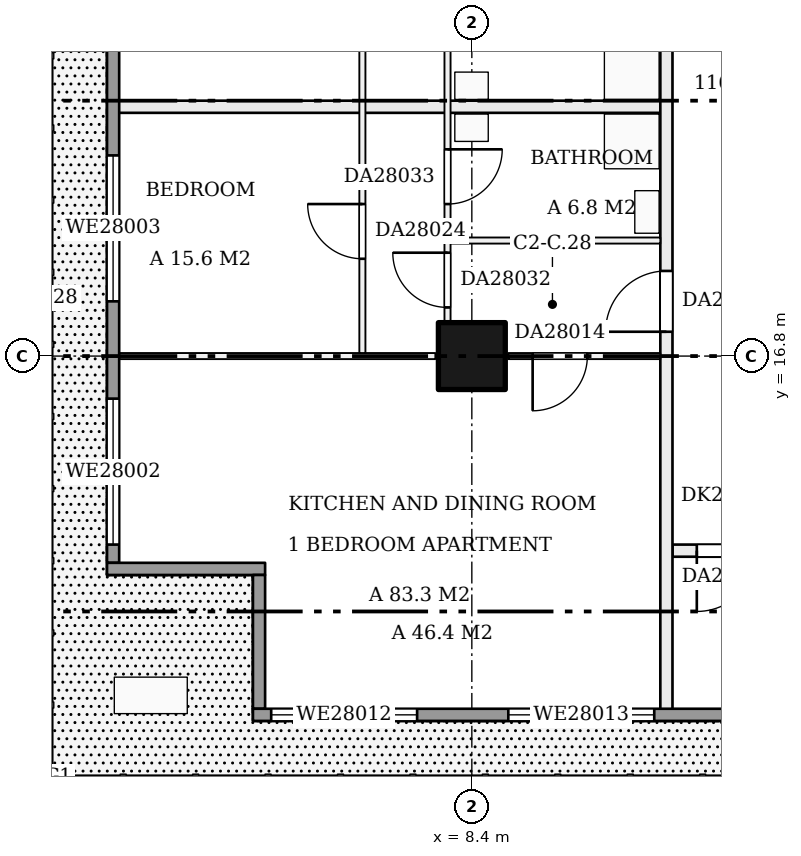
"""IFC4 building model, lengths in metres.
Left out: names, types, materials, properties, quantities, classifications, styles, units other than length and angle.
Written with IfcOpenShell. Run it as: python <this file> out.ifc"""

import sys

from ifc_helpers import new_model, si_unit, direction, frame, frame_2d, origin, origin_2d, place, context, subcontext, project, spatial, rectangle, extrude, element, fill, save


model = new_model("IFC4")
c1 = context("Model", 3, precision=1e-05, world=origin(), true_north=direction((0.0, 1.0)))
c2 = subcontext(c1, "Body", "Model", "MODEL_VIEW")
j1 = project(units=[si_unit("LENGTHUNIT", "METRE"), si_unit("PLANEANGLEUNIT", "RADIAN")], contexts=[c1])
p1 = place(None, origin())
s1 = spatial("IfcSite", under=j1, at=p1, CompositionType="ELEMENT")
p2 = place(p1, origin())
s2 = spatial("IfcBuilding", under=s1, at=p2, CompositionType="ELEMENT")
p3 = place(p2, frame((0.0, 0.0, 112.7)))
s3 = spatial("IfcBuildingStorey", under=s2, at=p3, CompositionType="ELEMENT", Elevation=112.7)
p4 = place(p3, frame((8.4, 16.8, 0.0), z_axis=(0.0, 0.0, 1.0), x_axis=(1.0, 0.0, 0.0)))
e1 = element("IfcColumn", 1, at=p4, inside=s3, PredefinedType="COLUMN", context=c2, shape_type="SweptSolid", body=[
    extrude(rectangle(XDim=1.1, YDim=1.1, at=origin_2d()), origin(), (0.0, 0.0, 1.0), 3.22),
])
p5 = place(p3, frame((11.7, 13.6, 0.0), z_axis=(0.0, 0.0, 1.0), x_axis=(1.0, 0.0, 0.0)))
e2 = element("IfcWall", 2, at=p5, inside=s3, PredefinedType="PARTITIONING", context=c2, shape_type="SweptSolid", body=[
    extrude(rectangle(XDim=1.8, YDim=0.2, at=frame_2d((0.9, 0.0))), origin(), (0.0, 0.0, 1.0), 3.22),
])
p6 = place(p5, frame((0.4, 0.0, 0.0)))
e3 = element("IfcOpeningElement", 3, at=p6, cuts=e2, PredefinedType="OPENING", context=c2, shape_type="SweptSolid", body=[
    extrude(rectangle(XDim=1.0, YDim=2.1, at=frame_2d((0.5, 1.05))), frame((0.0, 0.11, 0.0), z_axis=(0.0, -1.0, 0.0), x_axis=(1.0, 0.0, 0.0)), (0.0, 0.0, 1.0), 0.22),
])
p7 = place(p3, frame((2.5, 16.8, 0.0), z_axis=(0.0, 0.0, 1.0), x_axis=(1.0, 0.0, 0.0)))
e4 = element("IfcWall", 4, at=p7, inside=s3, PredefinedType="PARTITIONING", context=c2, shape_type="SweptSolid", body=[
    extrude(rectangle(XDim=5.3, YDim=0.1, at=frame_2d((2.65, 0.0))), origin(), (0.0, 0.0, 1.0), 3.22),
])
p8 = place(p3, frame((9.0, 16.8, 0.0), z_axis=(0.0, 0.0, 1.0), x_axis=(1.0, 0.0, 0.0)))
e5 = element("IfcWall", 5, at=p8, inside=s3, PredefinedType="PARTITIONING", context=c2, shape_type="SweptSolid", body=[
    extrude(rectangle(XDim=2.5, YDim=0.1, at=frame_2d((1.25, 0.0))), origin(), (0.0, 0.0, 1.0), 3.22),
])
p9 = place(p8, frame((0.4, 0.0, 0.0)))
e6 = element("IfcOpeningElement", 6, at=p9, cuts=e5, PredefinedType="OPENING", context=c2, shape_type="SweptSolid", body=[
    extrude(rectangle(XDim=0.9, YDim=2.1, at=frame_2d((0.45, 1.05))), frame((0.0, 0.06, 0.0), z_axis=(0.0, -1.0, 0.0), x_axis=(1.0, 0.0, 0.0)), (0.0, 0.0, 1.0), 0.12),
])
p10 = place(p3, frame((8.05, 18.7, 0.0), z_axis=(0.0, 0.0, 1.0), x_axis=(1.0, 0.0, 0.0)))
e7 = element("IfcWall", 7, at=p10, inside=s3, PredefinedType="PARTITIONING", context=c2, shape_type="SweptSolid", body=[
    extrude(rectangle(XDim=3.45, YDim=0.1, at=frame_2d((1.725, 0.0))), origin(), (0.0, 0.0, 1.0), 3.22),
])
p11 = place(p3, frame((2.5, 20.9, 0.0), z_axis=(0.0, 0.0, 1.0), x_axis=(1.0, 0.0, 0.0)))
e8 = element("IfcWall", 8, at=p11, inside=s3, PredefinedType="PARTITIONING", context=c2, shape_type="SweptSolid", body=[
    extrude(rectangle(XDim=9.0, YDim=0.2, at=frame_2d((4.5, 0.0))), origin(), (0.0, 0.0, 1.0), 3.22),
])
p12 = place(p3, frame((6.6, 16.85, 0.0), z_axis=(0.0, 0.0, 1.0), x_axis=(0.0, 1.0, 0.0)))
e9 = element("IfcWall", 9, at=p12, inside=s3, PredefinedType="PARTITIONING", context=c2, shape_type="SweptSolid", body=[
    extrude(rectangle(XDim=25.05, YDim=0.1, at=frame_2d((12.525, 0.0))), origin(), (0.0, 0.0, 1.0), 3.22),
])
p13 = place(p12, frame((1.55, 0.0, 0.0)))
e10 = element("IfcOpeningElement", 10, at=p13, cuts=e9, PredefinedType="OPENING", context=c2, shape_type="SweptSolid", body=[
    extrude(rectangle(XDim=0.9, YDim=2.1, at=frame_2d((0.45, 1.05))), frame((0.0, 0.06, 0.0), z_axis=(0.0, -1.0, 0.0), x_axis=(1.0, 0.0, 0.0)), (0.0, 0.0, 1.0), 0.12),
])
p14 = place(p12, frame((7.15, 0.0, 0.0)))
e11 = element("IfcOpeningElement", 11, at=p14, cuts=e9, PredefinedType="OPENING", context=c2, shape_type="SweptSolid", body=[
    extrude(rectangle(XDim=0.9, YDim=2.1, at=frame_2d((0.45, 1.05))), frame((0.0, 0.06, 0.0), z_axis=(0.0, -1.0, 0.0), x_axis=(1.0, 0.0, 0.0)), (0.0, 0.0, 1.0), 0.12),
])
p15 = place(p12, frame((14.15, 0.0, 0.0)))
e12 = element("IfcOpeningElement", 12, at=p15, cuts=e9, PredefinedType="OPENING", context=c2, shape_type="SweptSolid", body=[
    extrude(rectangle(XDim=0.9, YDim=2.1, at=frame_2d((0.45, 1.05))), frame((0.0, 0.06, 0.0), z_axis=(0.0, -1.0, 0.0), x_axis=(1.0, 0.0, 0.0)), (0.0, 0.0, 1.0), 0.12),
])
p16 = place(p12, frame((18.35, 0.0, 0.0)))
e13 = element("IfcOpeningElement", 13, at=p16, cuts=e9, PredefinedType="OPENING", context=c2, shape_type="SweptSolid", body=[
    extrude(rectangle(XDim=0.9, YDim=2.1, at=frame_2d((0.45, 1.05))), frame((0.0, 0.06, 0.0), z_axis=(0.0, -1.0, 0.0), x_axis=(1.0, 0.0, 0.0)), (0.0, 0.0, 1.0), 0.12),
])
p17 = place(p12, frame((22.55, 0.0, 0.0)))
e14 = element("IfcOpeningElement", 14, at=p17, cuts=e9, PredefinedType="OPENING", context=c2, shape_type="SweptSolid", body=[
    extrude(rectangle(XDim=0.9, YDim=2.1, at=frame_2d((0.45, 1.05))), frame((0.0, 0.06, 0.0), z_axis=(0.0, -1.0, 0.0), x_axis=(1.0, 0.0, 0.0)), (0.0, 0.0, 1.0), 0.12),
])
p18 = place(p3, frame((8.0, 16.85, 0.0), z_axis=(0.0, 0.0, 1.0), x_axis=(0.0, 1.0, 0.0)))
e15 = element("IfcWall", 15, at=p18, inside=s3, PredefinedType="PARTITIONING", context=c2, shape_type="SweptSolid", body=[
    extrude(rectangle(XDim=16.65, YDim=0.1, at=frame_2d((8.325, 0.0))), origin(), (0.0, 0.0, 1.0), 3.22),
])
p19 = place(p18, frame((0.75, 0.0, 0.0)))
e16 = element("IfcOpeningElement", 16, at=p19, cuts=e15, PredefinedType="OPENING", context=c2, shape_type="SweptSolid", body=[
    extrude(rectangle(XDim=0.9, YDim=2.1, at=frame_2d((0.45, 1.05))), frame((0.0, 0.06, 0.0), z_axis=(0.0, -1.0, 0.0), x_axis=(1.0, 0.0, 0.0)), (0.0, 0.0, 1.0), 0.12),
])
p20 = place(p18, frame((2.45, 0.0, 0.0)))
e17 = element("IfcOpeningElement", 17, at=p20, cuts=e15, PredefinedType="OPENING", context=c2, shape_type="SweptSolid", body=[
    extrude(rectangle(XDim=0.9, YDim=2.1, at=frame_2d((0.45, 1.05))), frame((0.0, 0.06, 0.0), z_axis=(0.0, -1.0, 0.0), x_axis=(1.0, 0.0, 0.0)), (0.0, 0.0, 1.0), 0.12),
])
p21 = place(p18, frame((9.075, 0.0, 0.0)))
e18 = element("IfcOpeningElement", 18, at=p21, cuts=e15, PredefinedType="OPENING", context=c2, shape_type="SweptSolid", body=[
    extrude(rectangle(XDim=0.9, YDim=2.1, at=frame_2d((0.45, 1.05))), frame((0.0, 0.06, 0.0), z_axis=(0.0, -1.0, 0.0), x_axis=(1.0, 0.0, 0.0)), (0.0, 0.0, 1.0), 0.12),
])
p22 = place(p18, frame((5.25, 0.0, 0.0)))
e19 = element("IfcOpeningElement", 19, at=p22, cuts=e15, PredefinedType="OPENING", context=c2, shape_type="SweptSolid", body=[
    extrude(rectangle(XDim=0.9, YDim=2.1, at=frame_2d((0.45, 1.05))), frame((0.0, 0.06, 0.0), z_axis=(0.0, -1.0, 0.0), x_axis=(1.0, 0.0, 0.0)), (0.0, 0.0, 1.0), 0.12),
])
p23 = place(p18, frame((11.2, 0.0, 0.0)))
e20 = element("IfcOpeningElement", 20, at=p23, cuts=e15, PredefinedType="OPENING", context=c2, shape_type="SweptSolid", body=[
    extrude(rectangle(XDim=0.9, YDim=2.1, at=frame_2d((0.45, 1.05))), frame((0.0, 0.06, 0.0), z_axis=(0.0, -1.0, 0.0), x_axis=(1.0, 0.0, 0.0)), (0.0, 0.0, 1.0), 0.12),
])
p24 = place(p18, frame((14.425, 0.0, 0.0)))
e21 = element("IfcOpeningElement", 21, at=p24, cuts=e15, PredefinedType="OPENING", context=c2, shape_type="SweptSolid", body=[
    extrude(rectangle(XDim=0.9, YDim=2.1, at=frame_2d((0.45, 1.05))), frame((0.0, 0.06, 0.0), z_axis=(0.0, -1.0, 0.0), x_axis=(1.0, 0.0, 0.0)), (0.0, 0.0, 1.0), 0.12),
])
p25 = place(p3, frame((11.6, 10.9, 0.0), z_axis=(0.0, 0.0, 1.0), x_axis=(0.0, 1.0, 0.0)))
e22 = element("IfcWall", 22, at=p25, inside=s3, PredefinedType="PARTITIONING", context=c2, shape_type="SweptSolid", body=[
    extrude(rectangle(XDim=31.1, YDim=0.2, at=frame_2d((15.55, 0.0))), origin(), (0.0, 0.0, 1.0), 3.22),
])
p26 = place(p25, frame((6.3, 0.0, 0.0)))
e23 = element("IfcOpeningElement", 23, at=p26, cuts=e22, PredefinedType="OPENING", context=c2, shape_type="SweptSolid", body=[
    extrude(rectangle(XDim=1.0, YDim=2.1, at=frame_2d((0.5, 1.05))), frame((0.0, 0.11, 0.0), z_axis=(0.0, -1.0, 0.0), x_axis=(1.0, 0.0, 0.0)), (0.0, 0.0, 1.0), 0.22),
])
p27 = place(p25, frame((14.225, 0.0, 0.0)))
e24 = element("IfcOpeningElement", 24, at=p27, cuts=e22, PredefinedType="OPENING", context=c2, shape_type="SweptSolid", body=[
    extrude(rectangle(XDim=1.0, YDim=2.1, at=frame_2d((0.5, 1.05))), frame((0.0, 0.11, 0.0), z_axis=(0.0, -1.0, 0.0), x_axis=(1.0, 0.0, 0.0)), (0.0, 0.0, 1.0), 0.22),
])
p28 = place(p25, frame((29.333, 0.0, 0.0)))
e25 = element("IfcOpeningElement", 25, at=p28, cuts=e22, PredefinedType="OPENING", context=c2, shape_type="SweptSolid", body=[
    extrude(rectangle(XDim=1.0, YDim=2.1, at=frame_2d((0.5, 1.05))), frame((0.0, 0.11, 0.0), z_axis=(0.0, -1.0, 0.0), x_axis=(1.0, 0.0, 0.0)), (0.0, 0.0, 1.0), 0.22),
])
p29 = place(p3, frame((2.5, 53.8, 0.0), z_axis=(0.0, 0.0, 1.0), x_axis=(0.0, -1.0, 0.0)))
e26 = element("IfcWall", 26, at=p29, inside=s3, PredefinedType="SOLIDWALL", context=c2, shape_type="SweptSolid", body=[
    extrude(rectangle(XDim=40.4, YDim=0.2, at=frame_2d((20.2, 0.0))), origin(), (0.0, 0.0, 1.0), 3.22),
])
p30 = place(p29, frame((37.7, 0.0, 0.9)))
e27 = element("IfcOpeningElement", 27, at=p30, cuts=e26, PredefinedType="OPENING", context=c2, shape_type="SweptSolid", body=[
    extrude(rectangle(XDim=2.4, YDim=1.5, at=frame_2d((1.2, 0.75))), frame((0.0, 0.11, 0.0), z_axis=(0.0, -1.0, 0.0), x_axis=(1.0, 0.0, 0.0)), (0.0, 0.0, 1.0), 0.22),
])
p31 = place(p29, frame((33.7, 0.0, 0.9)))
e28 = element("IfcOpeningElement", 28, at=p31, cuts=e26, PredefinedType="OPENING", context=c2, shape_type="SweptSolid", body=[
    extrude(rectangle(XDim=2.4, YDim=1.5, at=frame_2d((1.2, 0.75))), frame((0.0, 0.11, 0.0), z_axis=(0.0, -1.0, 0.0), x_axis=(1.0, 0.0, 0.0)), (0.0, 0.0, 1.0), 0.22),
])
p32 = place(p29, frame((29.5, 0.0, 0.0)))
e29 = element("IfcOpeningElement", 29, at=p32, cuts=e26, PredefinedType="OPENING", context=c2, shape_type="SweptSolid", body=[
    extrude(rectangle(XDim=2.4, YDim=2.2, at=frame_2d((1.2, 1.1))), frame((0.0, 0.11, 0.0), z_axis=(0.0, -1.0, 0.0), x_axis=(1.0, 0.0, 0.0)), (0.0, 0.0, 1.0), 0.22),
])
p33 = place(p29, frame((25.3, 0.0, 0.0)))
e30 = element("IfcOpeningElement", 30, at=p33, cuts=e26, PredefinedType="OPENING", context=c2, shape_type="SweptSolid", body=[
    extrude(rectangle(XDim=2.4, YDim=2.2, at=frame_2d((1.2, 1.1))), frame((0.0, 0.11, 0.0), z_axis=(0.0, -1.0, 0.0), x_axis=(1.0, 0.0, 0.0)), (0.0, 0.0, 1.0), 0.22),
])
p34 = place(p29, frame((21.1, 0.0, 0.9)))
e31 = element("IfcOpeningElement", 31, at=p34, cuts=e26, PredefinedType="OPENING", context=c2, shape_type="SweptSolid", body=[
    extrude(rectangle(XDim=2.4, YDim=1.5, at=frame_2d((1.2, 0.75))), frame((0.0, 0.11, 0.0), z_axis=(0.0, -1.0, 0.0), x_axis=(1.0, 0.0, 0.0)), (0.0, 0.0, 1.0), 0.22),
])
p35 = place(p29, frame((16.9, 0.0, 0.0)))
e32 = element("IfcOpeningElement", 32, at=p35, cuts=e26, PredefinedType="OPENING", context=c2, shape_type="SweptSolid", body=[
    extrude(rectangle(XDim=2.4, YDim=2.2, at=frame_2d((1.2, 1.1))), frame((0.0, 0.11, 0.0), z_axis=(0.0, -1.0, 0.0), x_axis=(1.0, 0.0, 0.0)), (0.0, 0.0, 1.0), 0.22),
])
p36 = place(p29, frame((12.7, 0.0, 0.9)))
e33 = element("IfcOpeningElement", 33, at=p36, cuts=e26, PredefinedType="OPENING", context=c2, shape_type="SweptSolid", body=[
    extrude(rectangle(XDim=2.4, YDim=1.5, at=frame_2d((1.2, 0.75))), frame((0.0, 0.11, 0.0), z_axis=(0.0, -1.0, 0.0), x_axis=(1.0, 0.0, 0.0)), (0.0, 0.0, 1.0), 0.22),
])
p37 = place(p29, frame((8.5, 0.0, 0.9)))
e34 = element("IfcOpeningElement", 34, at=p37, cuts=e26, PredefinedType="OPENING", context=c2, shape_type="SweptSolid", body=[
    extrude(rectangle(XDim=2.4, YDim=1.5, at=frame_2d((1.2, 0.75))), frame((0.0, 0.11, 0.0), z_axis=(0.0, -1.0, 0.0), x_axis=(1.0, 0.0, 0.0)), (0.0, 0.0, 1.0), 0.22),
])
p38 = place(p29, frame((4.3, 0.0, 0.9)))
e35 = element("IfcOpeningElement", 35, at=p38, cuts=e26, PredefinedType="OPENING", context=c2, shape_type="SweptSolid", body=[
    extrude(rectangle(XDim=2.4, YDim=1.5, at=frame_2d((1.2, 0.75))), frame((0.0, 0.11, 0.0), z_axis=(0.0, -1.0, 0.0), x_axis=(1.0, 0.0, 0.0)), (0.0, 0.0, 1.0), 0.22),
])
p39 = place(p29, frame((0.3, 0.0, 0.0)))
e36 = element("IfcOpeningElement", 36, at=p39, cuts=e26, PredefinedType="OPENING", context=c2, shape_type="SweptSolid", body=[
    extrude(rectangle(XDim=2.4, YDim=2.2, at=frame_2d((1.2, 1.1))), frame((0.0, 0.11, 0.0), z_axis=(0.0, -1.0, 0.0), x_axis=(1.0, 0.0, 0.0)), (0.0, 0.0, 1.0), 0.22),
])
p40 = place(p3, frame((2.4, 13.3, 0.0), z_axis=(0.0, 0.0, 1.0), x_axis=(1.0, 0.0, 0.0)))
e37 = element("IfcWall", 37, at=p40, inside=s3, PredefinedType="SOLIDWALL", context=c2, shape_type="SweptSolid", body=[
    extrude(rectangle(XDim=2.6, YDim=0.2, at=frame_2d((1.3, 0.0))), origin(), (0.0, 0.0, 1.0), 3.22),
])
p41 = place(p3, frame((4.9, 13.2, 0.0), z_axis=(0.0, 0.0, 1.0), x_axis=(0.0, -1.0, 0.0)))
e38 = element("IfcWall", 38, at=p41, inside=s3, PredefinedType="SOLIDWALL", context=c2, shape_type="SweptSolid", body=[
    extrude(rectangle(XDim=2.2, YDim=0.2, at=frame_2d((1.1, 0.0))), origin(), (0.0, 0.0, 1.0), 3.22),
])
p42 = place(p3, frame((4.8, 10.9, 0.0), z_axis=(0.0, 0.0, 1.0), x_axis=(1.0, 0.0, 0.0)))
e39 = element("IfcWall", 39, at=p42, inside=s3, PredefinedType="SOLIDWALL", context=c2, shape_type="SweptSolid", body=[
    extrude(rectangle(XDim=37.2, YDim=0.2, at=frame_2d((18.6, 0.0))), origin(), (0.0, 0.0, 1.0), 3.22),
])
p43 = place(p42, frame((0.3, 0.0, 0.9)))
e40 = element("IfcOpeningElement", 40, at=p43, cuts=e39, PredefinedType="OPENING", context=c2, shape_type="SweptSolid", body=[
    extrude(rectangle(XDim=2.4, YDim=1.5, at=frame_2d((1.2, 0.75))), frame((0.0, 0.11, 0.0), z_axis=(0.0, -1.0, 0.0), x_axis=(1.0, 0.0, 0.0)), (0.0, 0.0, 1.0), 0.22),
])
p44 = place(p42, frame((4.2, 0.0, 0.9)))
e41 = element("IfcOpeningElement", 41, at=p44, cuts=e39, PredefinedType="OPENING", context=c2, shape_type="SweptSolid", body=[
    extrude(rectangle(XDim=2.4, YDim=1.5, at=frame_2d((1.2, 0.75))), frame((0.0, 0.11, 0.0), z_axis=(0.0, -1.0, 0.0), x_axis=(1.0, 0.0, 0.0)), (0.0, 0.0, 1.0), 0.22),
])
p45 = place(p42, frame((12.9, 0.0, 0.0)))
e42 = element("IfcOpeningElement", 42, at=p45, cuts=e39, PredefinedType="OPENING", context=c2, shape_type="SweptSolid", body=[
    extrude(rectangle(XDim=2.4, YDim=2.2, at=frame_2d((1.2, 1.1))), frame((0.0, 0.11, 0.0), z_axis=(0.0, -1.0, 0.0), x_axis=(1.0, 0.0, 0.0)), (0.0, 0.0, 1.0), 0.22),
])
p46 = place(p42, frame((17.1, 0.0, 0.9)))
e43 = element("IfcOpeningElement", 43, at=p46, cuts=e39, PredefinedType="OPENING", context=c2, shape_type="SweptSolid", body=[
    extrude(rectangle(XDim=2.4, YDim=1.5, at=frame_2d((1.2, 0.75))), frame((0.0, 0.11, 0.0), z_axis=(0.0, -1.0, 0.0), x_axis=(1.0, 0.0, 0.0)), (0.0, 0.0, 1.0), 0.22),
])
p47 = place(p42, frame((21.3, 0.0, 0.9)))
e44 = element("IfcOpeningElement", 44, at=p47, cuts=e39, PredefinedType="OPENING", context=c2, shape_type="SweptSolid", body=[
    extrude(rectangle(XDim=2.4, YDim=1.5, at=frame_2d((1.2, 0.75))), frame((0.0, 0.11, 0.0), z_axis=(0.0, -1.0, 0.0), x_axis=(1.0, 0.0, 0.0)), (0.0, 0.0, 1.0), 0.22),
])
p48 = place(p42, frame((25.5, 0.0, 0.0)))
e45 = element("IfcOpeningElement", 45, at=p48, cuts=e39, PredefinedType="OPENING", context=c2, shape_type="SweptSolid", body=[
    extrude(rectangle(XDim=2.4, YDim=2.2, at=frame_2d((1.2, 1.1))), frame((0.0, 0.11, 0.0), z_axis=(0.0, -1.0, 0.0), x_axis=(1.0, 0.0, 0.0)), (0.0, 0.0, 1.0), 0.22),
])
p49 = place(p42, frame((29.7, 0.0, 0.9)))
e46 = element("IfcOpeningElement", 46, at=p49, cuts=e39, PredefinedType="OPENING", context=c2, shape_type="SweptSolid", body=[
    extrude(rectangle(XDim=2.4, YDim=1.5, at=frame_2d((1.2, 0.75))), frame((0.0, 0.11, 0.0), z_axis=(0.0, -1.0, 0.0), x_axis=(1.0, 0.0, 0.0)), (0.0, 0.0, 1.0), 0.22),
])
p50 = place(p42, frame((33.9, 0.0, 0.9)))
e47 = element("IfcOpeningElement", 47, at=p50, cuts=e39, PredefinedType="OPENING", context=c2, shape_type="SweptSolid", body=[
    extrude(rectangle(XDim=1.3, YDim=1.5, at=frame_2d((0.65, 0.75))), frame((0.0, 0.11, 0.0), z_axis=(0.0, -1.0, 0.0), x_axis=(1.0, 0.0, 0.0)), (0.0, 0.0, 1.0), 0.22),
])
p51 = place(p6, frame((1.0, 0.0, 0.0), z_axis=(0.0, 0.0, 1.0), x_axis=(-1.0, 0.0, 0.0)))
e48 = element("IfcDoor", 48, at=p51, inside=s3, OperationType="SINGLE_SWING_RIGHT", PredefinedType="DOOR", context=c2, shape_type="SweptSolid", body=[
    extrude(rectangle(XDim=1.0, YDim=2.1, at=frame_2d((0.5, 1.05))), frame((0.0, 0.025, 0.0), z_axis=(0.0, -1.0, 0.0), x_axis=(1.0, 0.0, 0.0)), (0.0, 0.0, 1.0), 0.05),
])
fill(e3, e48)
p52 = place(p9, frame((0.9, 0.0, 0.0), z_axis=(0.0, 0.0, 1.0), x_axis=(-1.0, 0.0, 0.0)))
e49 = element("IfcDoor", 49, at=p52, inside=s3, OperationType="SINGLE_SWING_RIGHT", PredefinedType="DOOR", context=c2, shape_type="SweptSolid", body=[
    extrude(rectangle(XDim=0.9, YDim=2.1, at=frame_2d((0.45, 1.05))), frame((0.0, 0.025, 0.0), z_axis=(0.0, -1.0, 0.0), x_axis=(1.0, 0.0, 0.0)), (0.0, 0.0, 1.0), 0.05),
])
fill(e6, e49)
p53 = place(p13, origin())
e50 = element("IfcDoor", 50, at=p53, inside=s3, OperationType="SINGLE_SWING_RIGHT", PredefinedType="DOOR", context=c2, shape_type="SweptSolid", body=[
    extrude(rectangle(XDim=0.9, YDim=2.1, at=frame_2d((0.45, 1.05))), frame((0.0, 0.025, 0.0), z_axis=(0.0, -1.0, 0.0), x_axis=(1.0, 0.0, 0.0)), (0.0, 0.0, 1.0), 0.05),
])
fill(e10, e50)
p54 = place(p19, origin())
e51 = element("IfcDoor", 51, at=p54, inside=s3, OperationType="SINGLE_SWING_RIGHT", PredefinedType="DOOR", context=c2, shape_type="SweptSolid", body=[
    extrude(rectangle(XDim=0.9, YDim=2.1, at=frame_2d((0.45, 1.05))), frame((0.0, 0.025, 0.0), z_axis=(0.0, -1.0, 0.0), x_axis=(1.0, 0.0, 0.0)), (0.0, 0.0, 1.0), 0.05),
])
fill(e16, e51)
p55 = place(p20, frame((0.9, 0.0, 0.0), z_axis=(0.0, 0.0, 1.0), x_axis=(-1.0, 0.0, 0.0)))
e52 = element("IfcDoor", 52, at=p55, inside=s3, OperationType="SINGLE_SWING_LEFT", PredefinedType="DOOR", context=c2, shape_type="SweptSolid", body=[
    extrude(rectangle(XDim=0.9, YDim=2.1, at=frame_2d((0.45, 1.05))), frame((0.0, 0.025, 0.0), z_axis=(0.0, -1.0, 0.0), x_axis=(1.0, 0.0, 0.0)), (0.0, 0.0, 1.0), 0.05),
])
fill(e17, e52)
p56 = place(p26, origin())
e53 = element("IfcDoor", 53, at=p56, inside=s3, OperationType="SINGLE_SWING_LEFT", PredefinedType="DOOR", context=c2, shape_type="SweptSolid", body=[
    extrude(rectangle(XDim=1.0, YDim=2.1, at=frame_2d((0.5, 1.05))), frame((0.0, 0.025, 0.0), z_axis=(0.0, -1.0, 0.0), x_axis=(1.0, 0.0, 0.0)), (0.0, 0.0, 1.0), 0.05),
])
fill(e23, e53)
p57 = place(p30, origin())
e54 = element("IfcWindow", 54, at=p57, inside=s3, PartitioningType="SINGLE_PANEL", PredefinedType="WINDOW", context=c2, shape_type="SweptSolid", body=[
    extrude(rectangle(XDim=2.4, YDim=1.5, at=frame_2d((1.2, 0.75))), frame((0.0, 0.03, 0.0), z_axis=(0.0, -1.0, 0.0), x_axis=(1.0, 0.0, 0.0)), (0.0, 0.0, 1.0), 0.06),
])
fill(e27, e54)
p58 = place(p31, origin())
e55 = element("IfcWindow", 55, at=p58, inside=s3, PartitioningType="SINGLE_PANEL", PredefinedType="WINDOW", context=c2, shape_type="SweptSolid", body=[
    extrude(rectangle(XDim=2.4, YDim=1.5, at=frame_2d((1.2, 0.75))), frame((0.0, 0.03, 0.0), z_axis=(0.0, -1.0, 0.0), x_axis=(1.0, 0.0, 0.0)), (0.0, 0.0, 1.0), 0.06),
])
fill(e28, e55)
p59 = place(p43, origin())
e56 = element("IfcWindow", 56, at=p59, inside=s3, PartitioningType="SINGLE_PANEL", PredefinedType="WINDOW", context=c2, shape_type="SweptSolid", body=[
    extrude(rectangle(XDim=2.4, YDim=1.5, at=frame_2d((1.2, 0.75))), frame((0.0, 0.03, 0.0), z_axis=(0.0, -1.0, 0.0), x_axis=(1.0, 0.0, 0.0)), (0.0, 0.0, 1.0), 0.06),
])
fill(e40, e56)
p60 = place(p44, origin())
e57 = element("IfcWindow", 57, at=p60, inside=s3, PartitioningType="SINGLE_PANEL", PredefinedType="WINDOW", context=c2, shape_type="SweptSolid", body=[
    extrude(rectangle(XDim=2.4, YDim=1.5, at=frame_2d((1.2, 0.75))), frame((0.0, 0.03, 0.0), z_axis=(0.0, -1.0, 0.0), x_axis=(1.0, 0.0, 0.0)), (0.0, 0.0, 1.0), 0.06),
])
fill(e41, e57)
save(model, sys.argv[1])
